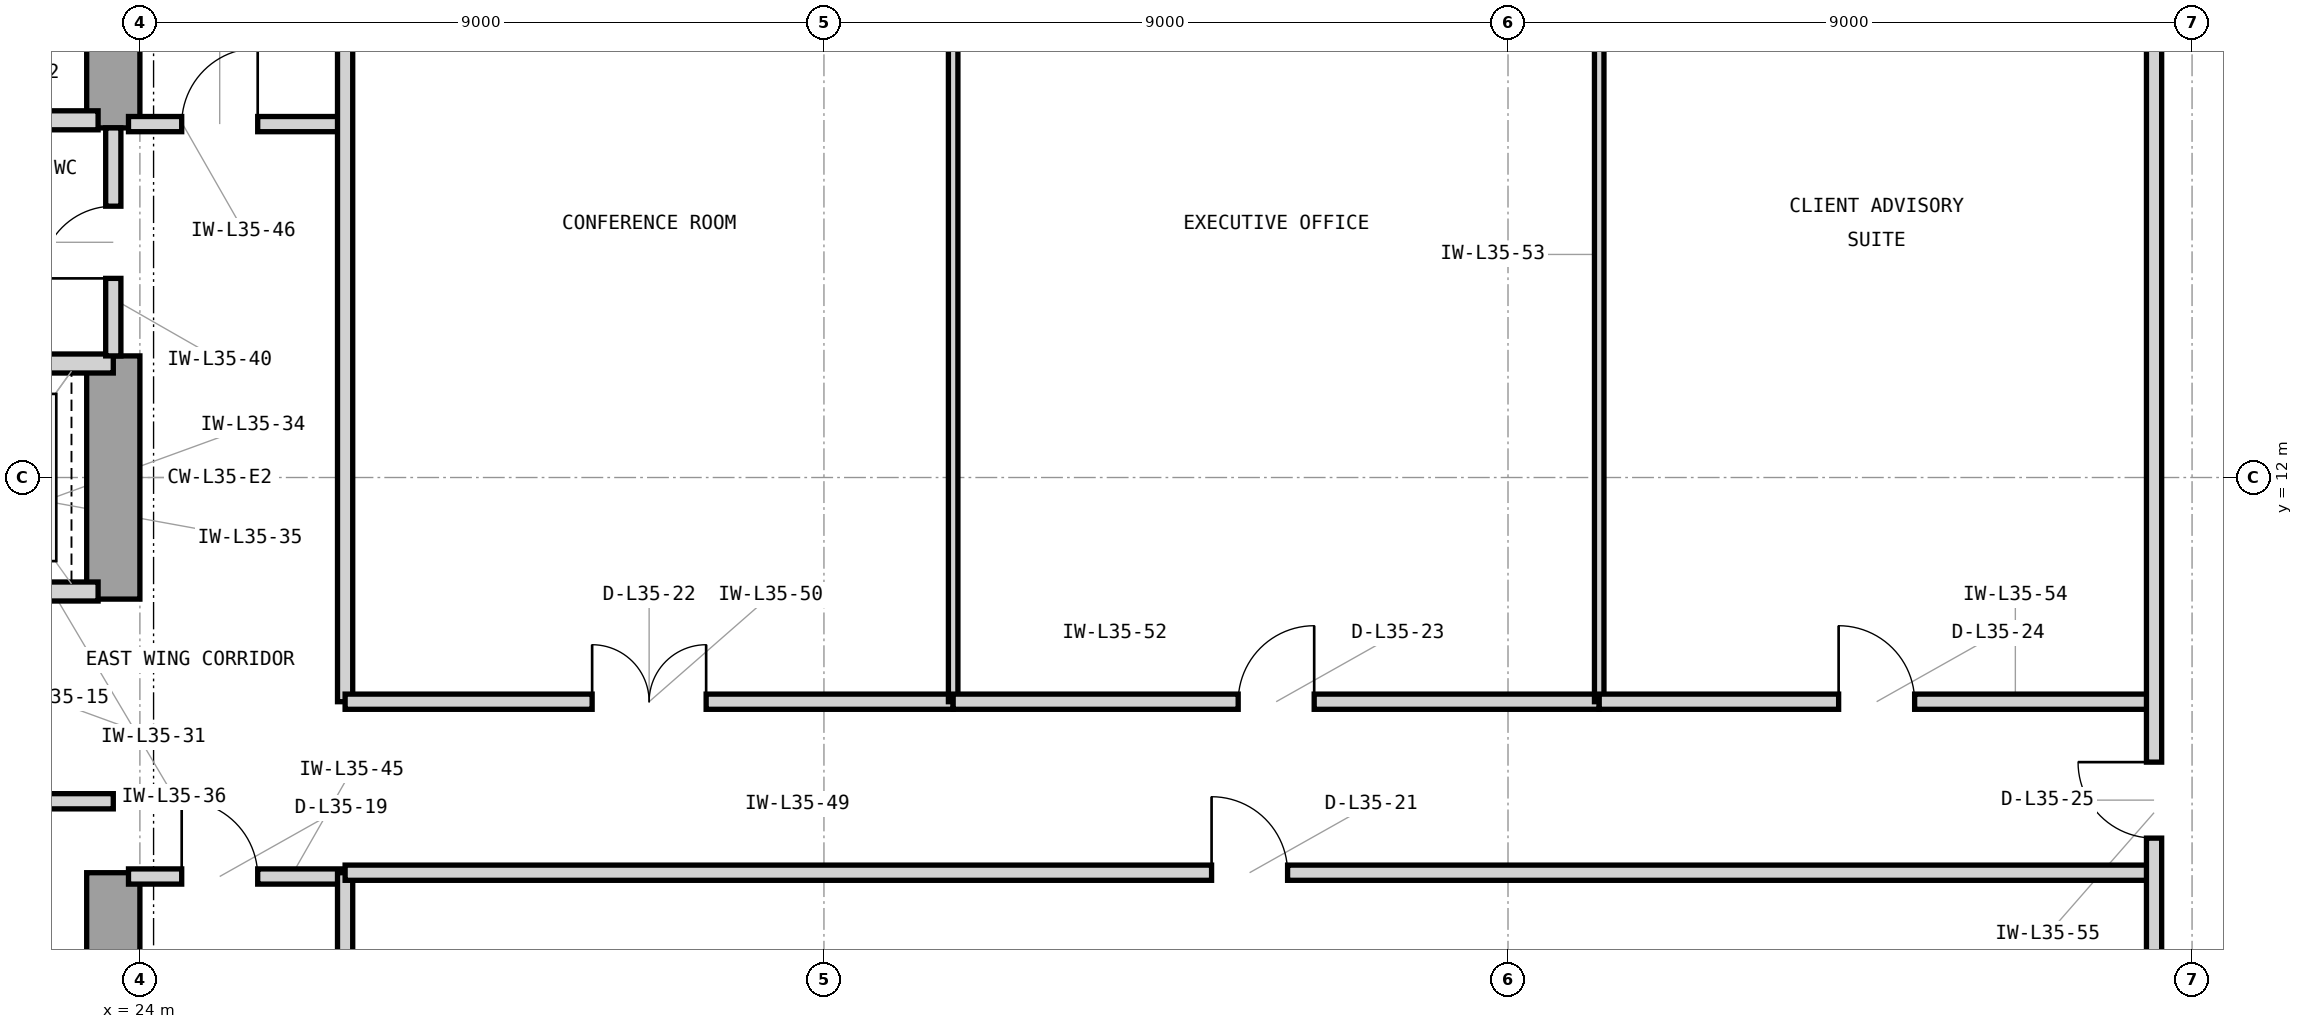
"""IFC4 building model, lengths in metres.
Left out: names, types, materials, properties, quantities, classifications, styles, units other than length and angle.
Written with IfcOpenShell. Run it as: python <this file> out.ifc"""

import sys

from ifc_helpers import new_model, si_unit, direction, frame, frame_2d, origin, place, context, subcontext, project, spatial, rectangle, extrude, element, fill, save


model = new_model("IFC4")
c1 = context("Model", 3, precision=1e-05, world=origin(), true_north=direction((0.0, 1.0)))
c2 = subcontext(c1, "Body", "Model", "MODEL_VIEW")
j1 = project(units=[si_unit("LENGTHUNIT", "METRE"), si_unit("PLANEANGLEUNIT", "RADIAN")], contexts=[c1])
p1 = place(None, origin())
s1 = spatial("IfcSite", under=j1, at=p1, CompositionType="ELEMENT")
p2 = place(p1, origin())
s2 = spatial("IfcBuilding", under=s1, at=p2, CompositionType="ELEMENT")
p3 = place(p2, frame((0.0, 0.0, 147.9)))
s3 = spatial("IfcBuildingStorey", under=s2, at=p3, CompositionType="ELEMENT", Elevation=147.9)
p4 = place(p3, frame((23.65, 3.7, 0.0), z_axis=(0.0, 0.0, 1.0), x_axis=(0.0, 1.0, 0.0)))
e1 = element("IfcWall", 1, at=p4, inside=s3, PredefinedType="SHEAR", context=c2, shape_type="SweptSolid", body=[
    extrude(rectangle(XDim=3.1, YDim=0.7, at=frame_2d((1.55, 0.0))), origin(), (0.0, 0.0, 1.0), 3.9),
])
p5 = place(p3, frame((23.65, 10.4, 0.0), z_axis=(0.0, 0.0, 1.0), x_axis=(0.0, 1.0, 0.0)))
e2 = element("IfcWall", 2, at=p5, inside=s3, PredefinedType="SHEAR", context=c2, shape_type="SweptSolid", body=[
    extrude(rectangle(XDim=3.2, YDim=0.7, at=frame_2d((1.6, 0.0))), origin(), (0.0, 0.0, 1.0), 3.9),
])
p6 = place(p3, frame((23.65, 16.6, 0.0), z_axis=(0.0, 0.0, 1.0), x_axis=(0.0, 1.0, 0.0)))
e3 = element("IfcWall", 3, at=p6, inside=s3, PredefinedType="SHEAR", context=c2, shape_type="SweptSolid", body=[
    extrude(rectangle(XDim=4.05, YDim=0.7, at=frame_2d((2.025, 0.0))), origin(), (0.0, 0.0, 1.0), 3.9),
])
p7 = place(p3, frame((21.05, 16.7, 0.0), z_axis=(0.0, 0.0, 1.0), x_axis=(1.0, 0.0, 0.0)))
e4 = element("IfcWall", 4, at=p7, inside=s3, PredefinedType="PARTITIONING", context=c2, shape_type="SweptSolid", body=[
    extrude(rectangle(XDim=2.4, YDim=0.25, at=frame_2d((1.2, 0.0))), origin(), (0.0, 0.0, 1.0), 3.233),
])
p8 = place(p3, frame((17.5, 7.74, 0.0), z_axis=(0.0, 0.0, 1.0), x_axis=(1.0, 0.0, 0.0)))
e5 = element("IfcWall", 5, at=p8, inside=s3, PredefinedType="PARTITIONING", context=c2, shape_type="SweptSolid", body=[
    extrude(rectangle(XDim=6.15, YDim=0.2, at=frame_2d((3.075, 0.0))), origin(), (0.0, 0.0, 1.0), 3.69),
])
p9 = place(p8, frame((2.575, 0.0, 0.0)))
e6 = element("IfcOpeningElement", 6, at=p9, cuts=e5, PredefinedType="OPENING", context=c2, shape_type="SweptSolid", body=[
    extrude(rectangle(XDim=1.0, YDim=2.15, at=frame_2d((0.5, 1.075))), frame((0.0, 0.11, 0.0), z_axis=(0.0, -1.0, 0.0), x_axis=(1.0, 0.0, 0.0)), (0.0, 0.0, 1.0), 0.22),
])
p10 = place(p3, frame((21.05, 10.5, 0.0), z_axis=(0.0, 0.0, 1.0), x_axis=(1.0, 0.0, 0.0)))
e7 = element("IfcWall", 7, at=p10, inside=s3, PredefinedType="PARTITIONING", context=c2, shape_type="SweptSolid", body=[
    extrude(rectangle(XDim=2.4, YDim=0.25, at=frame_2d((1.2, 0.0))), origin(), (0.0, 0.0, 1.0), 3.233),
])
p11 = place(p10, frame((0.48, 0.0, 0.0)))
e8 = element("IfcOpeningElement", 8, at=p11, cuts=e7, PredefinedType="OPENING", context=c2, shape_type="SweptSolid", body=[
    extrude(rectangle(XDim=1.15, YDim=2.25, at=frame_2d((0.575, 1.125))), frame((0.0, 0.135, 0.0), z_axis=(0.0, -1.0, 0.0), x_axis=(1.0, 0.0, 0.0)), (0.0, 0.0, 1.0), 0.27),
])
p12 = place(p3, frame((14.7, 13.5, 0.0), z_axis=(0.0, 0.0, 1.0), x_axis=(1.0, 0.0, 0.0)))
e9 = element("IfcWall", 9, at=p12, inside=s3, PredefinedType="PARTITIONING", context=c2, shape_type="SweptSolid", body=[
    extrude(rectangle(XDim=8.95, YDim=0.25, at=frame_2d((4.475, 0.0))), origin(), (0.0, 0.0, 1.0), 3.233),
])
p13 = place(p3, frame((23.65, 13.6, 0.0), z_axis=(0.0, 0.0, 1.0), x_axis=(0.0, 1.0, 0.0)))
e10 = element("IfcWall", 10, at=p13, inside=s3, PredefinedType="PARTITIONING", context=c2, shape_type="SweptSolid", body=[
    extrude(rectangle(XDim=3.0, YDim=0.2, at=frame_2d((1.5, 0.0))), origin(), (0.0, 0.0, 1.0), 3.69),
])
p14 = place(p13, frame((1.02, 0.0, 0.0)))
e11 = element("IfcOpeningElement", 11, at=p14, cuts=e10, PredefinedType="OPENING", context=c2, shape_type="SweptSolid", body=[
    extrude(rectangle(XDim=0.95, YDim=2.1, at=frame_2d((0.475, 1.05))), frame((0.0, 0.11, 0.0), z_axis=(0.0, -1.0, 0.0), x_axis=(1.0, 0.0, 0.0)), (0.0, 0.0, 1.0), 0.22),
])
p15 = place(p3, frame((23.85, 6.75, 0.0), z_axis=(0.0, 0.0, 1.0), x_axis=(1.0, 0.0, 0.0)))
e12 = element("IfcWall", 12, at=p15, inside=s3, PredefinedType="PARTITIONING", context=c2, shape_type="SweptSolid", body=[
    extrude(rectangle(XDim=2.85, YDim=0.2, at=frame_2d((1.425, 0.0))), origin(), (0.0, 0.0, 1.0), 3.69),
])
p16 = place(p15, frame((0.7, 0.0, 0.0)))
e13 = element("IfcOpeningElement", 13, at=p16, cuts=e12, PredefinedType="OPENING", context=c2, shape_type="SweptSolid", body=[
    extrude(rectangle(XDim=1.0, YDim=2.15, at=frame_2d((0.5, 1.075))), frame((0.0, 0.11, 0.0), z_axis=(0.0, -1.0, 0.0), x_axis=(1.0, 0.0, 0.0)), (0.0, 0.0, 1.0), 0.22),
])
p17 = place(p3, frame((23.85, 16.65, 0.0), z_axis=(0.0, 0.0, 1.0), x_axis=(1.0, 0.0, 0.0)))
e14 = element("IfcWall", 14, at=p17, inside=s3, PredefinedType="PARTITIONING", context=c2, shape_type="SweptSolid", body=[
    extrude(rectangle(XDim=2.85, YDim=0.2, at=frame_2d((1.425, 0.0))), origin(), (0.0, 0.0, 1.0), 3.69),
])
p18 = place(p17, frame((0.7, 0.0, 0.0)))
e15 = element("IfcOpeningElement", 15, at=p18, cuts=e14, PredefinedType="OPENING", context=c2, shape_type="SweptSolid", body=[
    extrude(rectangle(XDim=1.0, YDim=2.15, at=frame_2d((0.5, 1.075))), frame((0.0, 0.11, 0.0), z_axis=(0.0, -1.0, 0.0), x_axis=(1.0, 0.0, 0.0)), (0.0, 0.0, 1.0), 0.22),
])
p19 = place(p3, frame((26.7, 3.18, 0.0), z_axis=(0.0, 0.0, 1.0), x_axis=(0.0, 1.0, 0.0)))
e16 = element("IfcWall", 16, at=p19, inside=s3, PredefinedType="PARTITIONING", context=c2, shape_type="SweptSolid", body=[
    extrude(rectangle(XDim=3.62, YDim=0.2, at=frame_2d((1.81, 0.0))), origin(), (0.0, 0.0, 1.0), 3.69),
])
p20 = place(p3, frame((26.7, 9.05, 0.0), z_axis=(0.0, 0.0, 1.0), x_axis=(0.0, 1.0, 0.0)))
e17 = element("IfcWall", 17, at=p20, inside=s3, PredefinedType="PARTITIONING", context=c2, shape_type="SweptSolid", body=[
    extrude(rectangle(XDim=11.77, YDim=0.2, at=frame_2d((5.885, 0.0))), origin(), (0.0, 0.0, 1.0), 3.69),
])
p21 = place(p3, frame((26.7, 6.8, 0.0), z_axis=(0.0, 0.0, 1.0), x_axis=(1.0, 0.0, 0.0)))
e18 = element("IfcWall", 18, at=p21, inside=s3, PredefinedType="PARTITIONING", context=c2, shape_type="SweptSolid", body=[
    extrude(rectangle(XDim=23.8, YDim=0.2, at=frame_2d((11.9, 0.0))), origin(), (0.0, 0.0, 1.0), 3.69),
])
p22 = place(p21, frame((11.4, 0.0, 0.0)))
e19 = element("IfcOpeningElement", 19, at=p22, cuts=e18, PredefinedType="OPENING", context=c2, shape_type="SweptSolid", body=[
    extrude(rectangle(XDim=1.0, YDim=2.15, at=frame_2d((0.5, 1.075))), frame((0.0, 0.11, 0.0), z_axis=(0.0, -1.0, 0.0), x_axis=(1.0, 0.0, 0.0)), (0.0, 0.0, 1.0), 0.22),
])
p23 = place(p3, frame((26.7, 9.05, 0.0), z_axis=(0.0, 0.0, 1.0), x_axis=(1.0, 0.0, 0.0)))
e20 = element("IfcWall", 20, at=p23, inside=s3, PredefinedType="PARTITIONING", context=c2, shape_type="SweptSolid", body=[
    extrude(rectangle(XDim=8.0, YDim=0.2, at=frame_2d((4.0, 0.0))), origin(), (0.0, 0.0, 1.0), 3.233),
])
p24 = place(p23, frame((3.25, 0.0, 0.0)))
e21 = element("IfcOpeningElement", 21, at=p24, cuts=e20, PredefinedType="OPENING", context=c2, shape_type="SweptSolid", body=[
    extrude(rectangle(XDim=1.5, YDim=2.3, at=frame_2d((0.75, 1.15))), frame((0.0, 0.11, 0.0), z_axis=(0.0, -1.0, 0.0), x_axis=(1.0, 0.0, 0.0)), (0.0, 0.0, 1.0), 0.22),
])
p25 = place(p3, frame((34.7, 9.05, 0.0), z_axis=(0.0, 0.0, 1.0), x_axis=(0.0, 1.0, 0.0)))
e22 = element("IfcWall", 22, at=p25, inside=s3, PredefinedType="PARTITIONING", context=c2, shape_type="SweptSolid", body=[
    extrude(rectangle(XDim=11.77, YDim=0.125, at=frame_2d((5.885, 0.0))), origin(), (0.0, 0.0, 1.0), 3.69),
])
p26 = place(p3, frame((34.7, 9.05, 0.0), z_axis=(0.0, 0.0, 1.0), x_axis=(1.0, 0.0, 0.0)))
e23 = element("IfcWall", 23, at=p26, inside=s3, PredefinedType="PARTITIONING", context=c2, shape_type="SweptSolid", body=[
    extrude(rectangle(XDim=8.5, YDim=0.2, at=frame_2d((4.25, 0.0))), origin(), (0.0, 0.0, 1.0), 3.233),
])
p27 = place(p26, frame((3.75, 0.0, 0.0)))
e24 = element("IfcOpeningElement", 24, at=p27, cuts=e23, PredefinedType="OPENING", context=c2, shape_type="SweptSolid", body=[
    extrude(rectangle(XDim=1.0, YDim=2.15, at=frame_2d((0.5, 1.075))), frame((0.0, 0.11, 0.0), z_axis=(0.0, -1.0, 0.0), x_axis=(1.0, 0.0, 0.0)), (0.0, 0.0, 1.0), 0.22),
])
p28 = place(p3, frame((43.2, 9.05, 0.0), z_axis=(0.0, 0.0, 1.0), x_axis=(0.0, 1.0, 0.0)))
e25 = element("IfcWall", 25, at=p28, inside=s3, PredefinedType="PARTITIONING", context=c2, shape_type="SweptSolid", body=[
    extrude(rectangle(XDim=11.77, YDim=0.125, at=frame_2d((5.885, 0.0))), origin(), (0.0, 0.0, 1.0), 3.69),
])
p29 = place(p3, frame((43.2, 9.05, 0.0), z_axis=(0.0, 0.0, 1.0), x_axis=(1.0, 0.0, 0.0)))
e26 = element("IfcWall", 26, at=p29, inside=s3, PredefinedType="PARTITIONING", context=c2, shape_type="SweptSolid", body=[
    extrude(rectangle(XDim=7.3, YDim=0.2, at=frame_2d((3.65, 0.0))), origin(), (0.0, 0.0, 1.0), 3.233),
])
p30 = place(p29, frame((3.15, 0.0, 0.0)))
e27 = element("IfcOpeningElement", 27, at=p30, cuts=e26, PredefinedType="OPENING", context=c2, shape_type="SweptSolid", body=[
    extrude(rectangle(XDim=1.0, YDim=2.15, at=frame_2d((0.5, 1.075))), frame((0.0, 0.11, 0.0), z_axis=(0.0, -1.0, 0.0), x_axis=(1.0, 0.0, 0.0)), (0.0, 0.0, 1.0), 0.22),
])
p31 = place(p3, frame((50.5, 3.18, 0.0), z_axis=(0.0, 0.0, 1.0), x_axis=(0.0, 1.0, 0.0)))
e28 = element("IfcWall", 28, at=p31, inside=s3, PredefinedType="PARTITIONING", context=c2, shape_type="SweptSolid", body=[
    extrude(rectangle(XDim=17.64, YDim=0.2, at=frame_2d((8.82, 0.0))), origin(), (0.0, 0.0, 1.0), 3.69),
])
p32 = place(p31, frame((4.075, 0.0, 0.0)))
e29 = element("IfcOpeningElement", 29, at=p32, cuts=e28, PredefinedType="OPENING", context=c2, shape_type="SweptSolid", body=[
    extrude(rectangle(XDim=1.0, YDim=2.15, at=frame_2d((0.5, 1.075))), frame((0.0, 0.11, 0.0), z_axis=(0.0, -1.0, 0.0), x_axis=(1.0, 0.0, 0.0)), (0.0, 0.0, 1.0), 0.22),
])
p33 = place(p14, origin())
e30 = element("IfcDoor", 30, at=p33, inside=s3, OperationType="SINGLE_SWING_LEFT", PredefinedType="DOOR", context=c2, shape_type="SweptSolid", body=[
    extrude(rectangle(XDim=0.95, YDim=2.1, at=frame_2d((0.475, 1.05))), frame((0.0, 0.025, 0.0), z_axis=(0.0, -1.0, 0.0), x_axis=(1.0, 0.0, 0.0)), (0.0, 0.0, 1.0), 0.05),
])
fill(e11, e30)
p34 = place(p16, origin())
e31 = element("IfcDoor", 31, at=p34, inside=s3, OperationType="SINGLE_SWING_LEFT", PredefinedType="DOOR", context=c2, shape_type="SweptSolid", body=[
    extrude(rectangle(XDim=1.0, YDim=2.15, at=frame_2d((0.5, 1.075))), frame((0.0, 0.025, 0.0), z_axis=(0.0, -1.0, 0.0), x_axis=(1.0, 0.0, 0.0)), (0.0, 0.0, 1.0), 0.05),
])
fill(e13, e31)
p35 = place(p18, origin())
e32 = element("IfcDoor", 32, at=p35, inside=s3, OperationType="SINGLE_SWING_RIGHT", PredefinedType="DOOR", context=c2, shape_type="SweptSolid", body=[
    extrude(rectangle(XDim=1.0, YDim=2.15, at=frame_2d((0.5, 1.075))), frame((0.0, 0.025, 0.0), z_axis=(0.0, -1.0, 0.0), x_axis=(1.0, 0.0, 0.0)), (0.0, 0.0, 1.0), 0.05),
])
fill(e15, e32)
p36 = place(p22, origin())
e33 = element("IfcDoor", 33, at=p36, inside=s3, OperationType="SINGLE_SWING_LEFT", PredefinedType="DOOR", context=c2, shape_type="SweptSolid", body=[
    extrude(rectangle(XDim=1.0, YDim=2.15, at=frame_2d((0.5, 1.075))), frame((0.0, 0.025, 0.0), z_axis=(0.0, -1.0, 0.0), x_axis=(1.0, 0.0, 0.0)), (0.0, 0.0, 1.0), 0.05),
])
fill(e19, e33)
p37 = place(p24, origin())
e34 = element("IfcDoor", 34, at=p37, inside=s3, OperationType="DOUBLE_DOOR_SINGLE_SWING", PredefinedType="DOOR", context=c2, shape_type="SweptSolid", body=[
    extrude(rectangle(XDim=1.5, YDim=2.3, at=frame_2d((0.75, 1.15))), frame((0.0, 0.025, 0.0), z_axis=(0.0, -1.0, 0.0), x_axis=(1.0, 0.0, 0.0)), (0.0, 0.0, 1.0), 0.05),
])
fill(e21, e34)
p38 = place(p27, origin())
e35 = element("IfcDoor", 35, at=p38, inside=s3, OperationType="SINGLE_SWING_RIGHT", PredefinedType="DOOR", context=c2, shape_type="SweptSolid", body=[
    extrude(rectangle(XDim=1.0, YDim=2.15, at=frame_2d((0.5, 1.075))), frame((0.0, 0.025, 0.0), z_axis=(0.0, -1.0, 0.0), x_axis=(1.0, 0.0, 0.0)), (0.0, 0.0, 1.0), 0.05),
])
fill(e24, e35)
p39 = place(p30, origin())
e36 = element("IfcDoor", 36, at=p39, inside=s3, OperationType="SINGLE_SWING_LEFT", PredefinedType="DOOR", context=c2, shape_type="SweptSolid", body=[
    extrude(rectangle(XDim=1.0, YDim=2.15, at=frame_2d((0.5, 1.075))), frame((0.0, 0.025, 0.0), z_axis=(0.0, -1.0, 0.0), x_axis=(1.0, 0.0, 0.0)), (0.0, 0.0, 1.0), 0.05),
])
fill(e27, e36)
p40 = place(p32, origin())
e37 = element("IfcDoor", 37, at=p40, inside=s3, OperationType="SINGLE_SWING_RIGHT", PredefinedType="DOOR", context=c2, shape_type="SweptSolid", body=[
    extrude(rectangle(XDim=1.0, YDim=2.15, at=frame_2d((0.5, 1.075))), frame((0.0, 0.025, 0.0), z_axis=(0.0, -1.0, 0.0), x_axis=(1.0, 0.0, 0.0)), (0.0, 0.0, 1.0), 0.05),
])
fill(e29, e37)
save(model, sys.argv[1])
